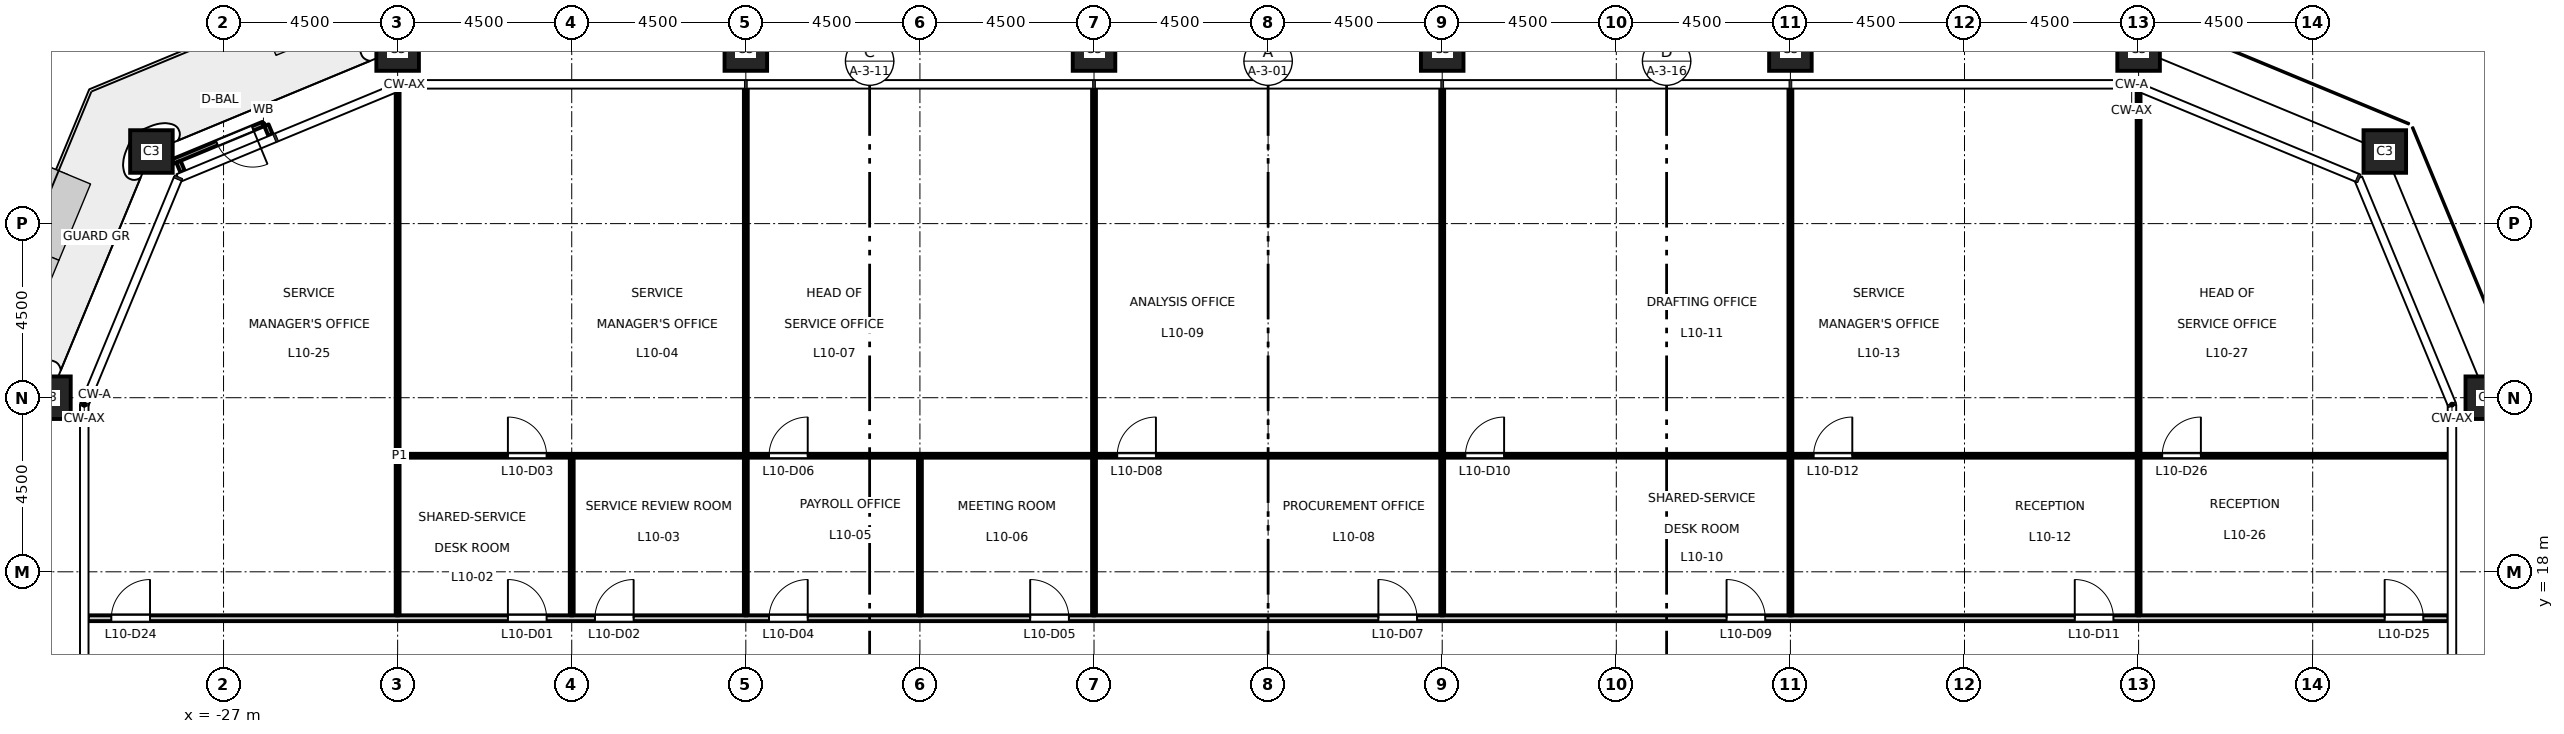
"""IFC4 building model, lengths in metres.
Left out: names, types, materials, properties, quantities, classifications, styles, units other than length and angle.
Written with IfcOpenShell. Run it as: python <this file> out.ifc"""

import sys

from ifc_helpers import new_model, si_unit, direction, frame, frame_2d, origin, origin_2d, place, context, subcontext, project, spatial, rectangle, hollow_rectangle, extrude, element, fill, save


model = new_model("IFC4")
c1 = context("Model", 3, precision=1e-05, world=origin(), true_north=direction((0.0, 1.0)))
c2 = subcontext(c1, "Body", "Model", "MODEL_VIEW")
j1 = project(units=[si_unit("LENGTHUNIT", "METRE"), si_unit("PLANEANGLEUNIT", "RADIAN")], contexts=[c1])
p1 = place(None, origin())
s1 = spatial("IfcSite", under=j1, at=p1, CompositionType="ELEMENT")
p2 = place(p1, origin())
s2 = spatial("IfcBuilding", under=s1, at=p2, CompositionType="ELEMENT")
p3 = place(p2, frame((0.0, 0.0, 49.2)))
s3 = spatial("IfcBuildingStorey", under=s2, at=p3, CompositionType="ELEMENT", Elevation=49.2)
for number, where, z_axis, x_axis in (
    (1, (31.5, 22.5, 0.0), (0.0, 0.0, 1.0), (1.0, 0.0, 0.0)),
    (2, (28.864, 28.864, 0.0), (0.0, 0.0, 1.0), (1.0, 0.0, 0.0)),
    (3, (22.5, 31.5, 0.0), (0.0, 0.0, 1.0), (1.0, 0.0, 0.0)),
    (4, (13.5, 31.5, 0.0), (0.0, 0.0, 1.0), (1.0, 0.0, 0.0)),
    (5, (4.5, 31.5, 0.0), (0.0, 0.0, 1.0), (1.0, 0.0, 0.0)),
    (6, (-4.5, 31.5, 0.0), (0.0, 0.0, 1.0), (1.0, 0.0, 0.0)),
    (7, (-13.5, 31.5, 0.0), (0.0, 0.0, 1.0), (1.0, 0.0, 0.0)),
    (8, (-22.5, 31.5, 0.0), (0.0, 0.0, 1.0), (1.0, 0.0, 0.0)),
    (9, (-28.864, 28.864, 0.0), (0.0, 0.0, 1.0), (1.0, 0.0, 0.0)),
    (10, (-31.5, 22.5, 0.0), (0.0, 0.0, 1.0), (1.0, 0.0, 0.0)),
):
    element("IfcColumn", number, at=place(p3, frame(where, z_axis=z_axis, x_axis=x_axis)), inside=s3, PredefinedType="COLUMN", context=c2, shape_type="SweptSolid", body=[
        extrude(hollow_rectangle(XDim=1.1, YDim=1.1, WallThickness=0.07, at=origin_2d()), origin(), (0.0, 0.0, 1.0), 4.5),
    ])
p4 = place(p3, frame((-25.783, 29.285, 0.0), z_axis=(0.0, 0.0, 1.0), x_axis=(-0.382942403136, 0.923772220778, 0.0)))
e11 = element("IfcWall", 11, at=p4, inside=s3, PredefinedType="STANDARD", context=c2, shape_type="SweptSolid", body=[
    extrude(rectangle(XDim=0.28, YDim=0.12, at=frame_2d((0.14, 0.0))), origin(), (0.0, 0.0, 1.0), 4.35),
])
p5 = place(p3, frame((-28.058, 28.343, 0.0), z_axis=(0.0, 0.0, 1.0), x_axis=(-0.382634050621, 0.923899985553, 0.0)))
e12 = element("IfcWall", 12, at=p5, inside=s3, PredefinedType="STANDARD", context=c2, shape_type="SweptSolid", body=[
    extrude(rectangle(XDim=0.28, YDim=0.12, at=frame_2d((0.14, 0.0))), origin(), (0.0, 0.0, 1.0), 4.35),
])
p6 = place(p3, frame((-25.969, 29.576, 0.0), z_axis=(0.0, 0.0, 1.0), x_axis=(-0.923897258763, -0.382640634603, 0.0)))
e13 = element("IfcWall", 13, at=p6, inside=s3, PredefinedType="STANDARD", context=c2, shape_type="SweptSolid", body=[
    extrude(rectangle(XDim=2.538, YDim=0.12, at=frame_2d((1.269, 0.0))), origin(), (0.0, 0.0, 1.0), 4.35),
])
p7 = place(p6, frame((0.3, 0.0, 0.0)))
e14 = element("IfcOpeningElement", 14, at=p7, cuts=e13, PredefinedType="OPENING", context=c2, shape_type="SweptSolid", body=[
    extrude(rectangle(XDim=1.0, YDim=2.4, at=frame_2d((0.5, 1.2))), frame((0.0, 0.07, 0.0), z_axis=(0.0, -1.0, 0.0), x_axis=(1.0, 0.0, 0.0)), (0.0, 0.0, 1.0), 0.14),
])
p8 = place(p3, frame((-30.51, 16.8, 0.0), z_axis=(0.0, 0.0, 1.0), x_axis=(1.0, 0.0, 0.0)))
e15 = element("IfcWall", 15, at=p8, inside=s3, PredefinedType="PARTITIONING", context=c2, shape_type="SweptSolid", body=[
    extrude(rectangle(XDim=61.02, YDim=0.15, at=frame_2d((30.51, 0.0))), origin(), (0.0, 0.0, 1.0), 4.35),
])
p9 = place(p8, frame((10.86, 0.0, 0.0)))
e16 = element("IfcOpeningElement", 16, at=p9, cuts=e15, PredefinedType="OPENING", context=c2, shape_type="SweptSolid", body=[
    extrude(rectangle(XDim=1.0, YDim=2.1, at=frame_2d((0.5, 1.05))), frame((0.0, 0.085, 0.0), z_axis=(0.0, -1.0, 0.0), x_axis=(1.0, 0.0, 0.0)), (0.0, 0.0, 1.0), 0.17),
])
p10 = place(p8, frame((13.11, 0.0, 0.0)))
e17 = element("IfcOpeningElement", 17, at=p10, cuts=e15, PredefinedType="OPENING", context=c2, shape_type="SweptSolid", body=[
    extrude(rectangle(XDim=1.0, YDim=2.1, at=frame_2d((0.5, 1.05))), frame((0.0, 0.085, 0.0), z_axis=(0.0, -1.0, 0.0), x_axis=(1.0, 0.0, 0.0)), (0.0, 0.0, 1.0), 0.17),
])
p11 = place(p8, frame((17.61, 0.0, 0.0)))
e18 = element("IfcOpeningElement", 18, at=p11, cuts=e15, PredefinedType="OPENING", context=c2, shape_type="SweptSolid", body=[
    extrude(rectangle(XDim=1.0, YDim=2.1, at=frame_2d((0.5, 1.05))), frame((0.0, 0.085, 0.0), z_axis=(0.0, -1.0, 0.0), x_axis=(1.0, 0.0, 0.0)), (0.0, 0.0, 1.0), 0.17),
])
p12 = place(p8, frame((24.36, 0.0, 0.0)))
e19 = element("IfcOpeningElement", 19, at=p12, cuts=e15, PredefinedType="OPENING", context=c2, shape_type="SweptSolid", body=[
    extrude(rectangle(XDim=1.0, YDim=2.1, at=frame_2d((0.5, 1.05))), frame((0.0, 0.085, 0.0), z_axis=(0.0, -1.0, 0.0), x_axis=(1.0, 0.0, 0.0)), (0.0, 0.0, 1.0), 0.17),
])
p13 = place(p8, frame((33.36, 0.0, 0.0)))
e20 = element("IfcOpeningElement", 20, at=p13, cuts=e15, PredefinedType="OPENING", context=c2, shape_type="SweptSolid", body=[
    extrude(rectangle(XDim=1.0, YDim=2.1, at=frame_2d((0.5, 1.05))), frame((0.0, 0.085, 0.0), z_axis=(0.0, -1.0, 0.0), x_axis=(1.0, 0.0, 0.0)), (0.0, 0.0, 1.0), 0.17),
])
p14 = place(p8, frame((42.36, 0.0, 0.0)))
e21 = element("IfcOpeningElement", 21, at=p14, cuts=e15, PredefinedType="OPENING", context=c2, shape_type="SweptSolid", body=[
    extrude(rectangle(XDim=1.0, YDim=2.1, at=frame_2d((0.5, 1.05))), frame((0.0, 0.085, 0.0), z_axis=(0.0, -1.0, 0.0), x_axis=(1.0, 0.0, 0.0)), (0.0, 0.0, 1.0), 0.17),
])
p15 = place(p8, frame((51.36, 0.0, 0.0)))
e22 = element("IfcOpeningElement", 22, at=p15, cuts=e15, PredefinedType="OPENING", context=c2, shape_type="SweptSolid", body=[
    extrude(rectangle(XDim=1.0, YDim=2.1, at=frame_2d((0.5, 1.05))), frame((0.0, 0.085, 0.0), z_axis=(0.0, -1.0, 0.0), x_axis=(1.0, 0.0, 0.0)), (0.0, 0.0, 1.0), 0.17),
])
p16 = place(p8, frame((0.61, 0.0, 0.0)))
e23 = element("IfcOpeningElement", 23, at=p16, cuts=e15, PredefinedType="OPENING", context=c2, shape_type="SweptSolid", body=[
    extrude(rectangle(XDim=1.0, YDim=2.1, at=frame_2d((0.5, 1.05))), frame((0.0, 0.085, 0.0), z_axis=(0.0, -1.0, 0.0), x_axis=(1.0, 0.0, 0.0)), (0.0, 0.0, 1.0), 0.17),
])
p17 = place(p8, frame((59.37, 0.0, 0.0)))
e24 = element("IfcOpeningElement", 24, at=p17, cuts=e15, PredefinedType="OPENING", context=c2, shape_type="SweptSolid", body=[
    extrude(rectangle(XDim=1.0, YDim=2.1, at=frame_2d((0.5, 1.05))), frame((0.0, 0.085, 0.0), z_axis=(0.0, -1.0, 0.0), x_axis=(1.0, 0.0, 0.0)), (0.0, 0.0, 1.0), 0.17),
])
p18 = place(p3, frame((-22.45, 21.0, 0.0), z_axis=(0.0, 0.0, 1.0), x_axis=(1.0, 0.0, 0.0)))
e25 = element("IfcWall", 25, at=p18, inside=s3, PredefinedType="PARTITIONING", context=c2, shape_type="SweptSolid", body=[
    extrude(rectangle(XDim=52.96, YDim=0.1, at=frame_2d((26.48, 0.0))), origin(), (0.0, 0.0, 1.0), 4.35),
])
p19 = place(p18, frame((2.8, 0.0, 0.0)))
e26 = element("IfcOpeningElement", 26, at=p19, cuts=e25, PredefinedType="OPENING", context=c2, shape_type="SweptSolid", body=[
    extrude(rectangle(XDim=1.0, YDim=2.1, at=frame_2d((0.5, 1.05))), frame((0.0, 0.06, 0.0), z_axis=(0.0, -1.0, 0.0), x_axis=(1.0, 0.0, 0.0)), (0.0, 0.0, 1.0), 0.12),
])
p20 = place(p18, frame((9.55, 0.0, 0.0)))
e27 = element("IfcOpeningElement", 27, at=p20, cuts=e25, PredefinedType="OPENING", context=c2, shape_type="SweptSolid", body=[
    extrude(rectangle(XDim=1.0, YDim=2.1, at=frame_2d((0.5, 1.05))), frame((0.0, 0.06, 0.0), z_axis=(0.0, -1.0, 0.0), x_axis=(1.0, 0.0, 0.0)), (0.0, 0.0, 1.0), 0.12),
])
p21 = place(p18, frame((18.55, 0.0, 0.0)))
e28 = element("IfcOpeningElement", 28, at=p21, cuts=e25, PredefinedType="OPENING", context=c2, shape_type="SweptSolid", body=[
    extrude(rectangle(XDim=1.0, YDim=2.1, at=frame_2d((0.5, 1.05))), frame((0.0, 0.06, 0.0), z_axis=(0.0, -1.0, 0.0), x_axis=(1.0, 0.0, 0.0)), (0.0, 0.0, 1.0), 0.12),
])
p22 = place(p18, frame((27.55, 0.0, 0.0)))
e29 = element("IfcOpeningElement", 29, at=p22, cuts=e25, PredefinedType="OPENING", context=c2, shape_type="SweptSolid", body=[
    extrude(rectangle(XDim=1.0, YDim=2.1, at=frame_2d((0.5, 1.05))), frame((0.0, 0.06, 0.0), z_axis=(0.0, -1.0, 0.0), x_axis=(1.0, 0.0, 0.0)), (0.0, 0.0, 1.0), 0.12),
])
p23 = place(p18, frame((36.55, 0.0, 0.0)))
e30 = element("IfcOpeningElement", 30, at=p23, cuts=e25, PredefinedType="OPENING", context=c2, shape_type="SweptSolid", body=[
    extrude(rectangle(XDim=1.0, YDim=2.1, at=frame_2d((0.5, 1.05))), frame((0.0, 0.06, 0.0), z_axis=(0.0, -1.0, 0.0), x_axis=(1.0, 0.0, 0.0)), (0.0, 0.0, 1.0), 0.12),
])
p24 = place(p18, frame((45.56, 0.0, 0.0)))
e31 = element("IfcOpeningElement", 31, at=p24, cuts=e25, PredefinedType="OPENING", context=c2, shape_type="SweptSolid", body=[
    extrude(rectangle(XDim=1.0, YDim=2.1, at=frame_2d((0.5, 1.05))), frame((0.0, 0.06, 0.0), z_axis=(0.0, -1.0, 0.0), x_axis=(1.0, 0.0, 0.0)), (0.0, 0.0, 1.0), 0.12),
])
p25 = place(p3, frame((-22.5, 16.875, 0.0), z_axis=(0.0, 0.0, 1.0), x_axis=(0.0, 1.0, 0.0)))
e32 = element("IfcWall", 32, at=p25, inside=s3, PredefinedType="PARTITIONING", context=c2, shape_type="SweptSolid", body=[
    extrude(rectangle(XDim=13.553, YDim=0.1, at=frame_2d((6.776, 0.0))), origin(), (0.0, 0.0, 1.0), 3.35),
])
p26 = place(p3, frame((-18.0, 16.875, 0.0), z_axis=(0.0, 0.0, 1.0), x_axis=(0.0, 1.0, 0.0)))
e33 = element("IfcWall", 33, at=p26, inside=s3, PredefinedType="PARTITIONING", context=c2, shape_type="SweptSolid", body=[
    extrude(rectangle(XDim=4.075, YDim=0.1, at=frame_2d((2.038, 0.0))), origin(), (0.0, 0.0, 1.0), 4.35),
])
p27 = place(p3, frame((-13.5, 16.875, 0.0), z_axis=(0.0, 0.0, 1.0), x_axis=(0.0, 1.0, 0.0)))
e34 = element("IfcWall", 34, at=p27, inside=s3, PredefinedType="PARTITIONING", context=c2, shape_type="SweptSolid", body=[
    extrude(rectangle(XDim=4.075, YDim=0.1, at=frame_2d((2.038, 0.0))), origin(), (0.0, 0.0, 1.0), 3.35),
])
p28 = place(p3, frame((-13.5, 21.05, 0.0), z_axis=(0.0, 0.0, 1.0), x_axis=(0.0, 1.0, 0.0)))
e35 = element("IfcWall", 35, at=p28, inside=s3, PredefinedType="PARTITIONING", context=c2, shape_type="SweptSolid", body=[
    extrude(rectangle(XDim=9.46, YDim=0.1, at=frame_2d((4.73, 0.0))), origin(), (0.0, 0.0, 1.0), 3.35),
])
p29 = place(p3, frame((-9.0, 16.875, 0.0), z_axis=(0.0, 0.0, 1.0), x_axis=(0.0, 1.0, 0.0)))
e36 = element("IfcWall", 36, at=p29, inside=s3, PredefinedType="PARTITIONING", context=c2, shape_type="SweptSolid", body=[
    extrude(rectangle(XDim=4.075, YDim=0.1, at=frame_2d((2.038, 0.0))), origin(), (0.0, 0.0, 1.0), 4.35),
])
p30 = place(p3, frame((-4.5, 16.875, 0.0), z_axis=(0.0, 0.0, 1.0), x_axis=(0.0, 1.0, 0.0)))
e37 = element("IfcWall", 37, at=p30, inside=s3, PredefinedType="PARTITIONING", context=c2, shape_type="SweptSolid", body=[
    extrude(rectangle(XDim=4.075, YDim=0.1, at=frame_2d((2.038, 0.0))), origin(), (0.0, 0.0, 1.0), 3.35),
])
p31 = place(p3, frame((-4.5, 21.05, 0.0), z_axis=(0.0, 0.0, 1.0), x_axis=(0.0, 1.0, 0.0)))
e38 = element("IfcWall", 38, at=p31, inside=s3, PredefinedType="PARTITIONING", context=c2, shape_type="SweptSolid", body=[
    extrude(rectangle(XDim=9.46, YDim=0.1, at=frame_2d((4.73, 0.0))), origin(), (0.0, 0.0, 1.0), 3.35),
])
p32 = place(p3, frame((4.5, 16.875, 0.0), z_axis=(0.0, 0.0, 1.0), x_axis=(0.0, 1.0, 0.0)))
e39 = element("IfcWall", 39, at=p32, inside=s3, PredefinedType="PARTITIONING", context=c2, shape_type="SweptSolid", body=[
    extrude(rectangle(XDim=4.075, YDim=0.1, at=frame_2d((2.038, 0.0))), origin(), (0.0, 0.0, 1.0), 3.35),
])
p33 = place(p3, frame((4.5, 21.05, 0.0), z_axis=(0.0, 0.0, 1.0), x_axis=(0.0, 1.0, 0.0)))
e40 = element("IfcWall", 40, at=p33, inside=s3, PredefinedType="PARTITIONING", context=c2, shape_type="SweptSolid", body=[
    extrude(rectangle(XDim=9.46, YDim=0.1, at=frame_2d((4.73, 0.0))), origin(), (0.0, 0.0, 1.0), 3.35),
])
p34 = place(p3, frame((13.5, 16.875, 0.0), z_axis=(0.0, 0.0, 1.0), x_axis=(0.0, 1.0, 0.0)))
e41 = element("IfcWall", 41, at=p34, inside=s3, PredefinedType="PARTITIONING", context=c2, shape_type="SweptSolid", body=[
    extrude(rectangle(XDim=4.075, YDim=0.1, at=frame_2d((2.038, 0.0))), origin(), (0.0, 0.0, 1.0), 3.35),
])
p35 = place(p3, frame((13.5, 21.05, 0.0), z_axis=(0.0, 0.0, 1.0), x_axis=(0.0, 1.0, 0.0)))
e42 = element("IfcWall", 42, at=p35, inside=s3, PredefinedType="PARTITIONING", context=c2, shape_type="SweptSolid", body=[
    extrude(rectangle(XDim=9.46, YDim=0.1, at=frame_2d((4.73, 0.0))), origin(), (0.0, 0.0, 1.0), 3.35),
])
p36 = place(p3, frame((22.5, 16.875, 0.0), z_axis=(0.0, 0.0, 1.0), x_axis=(0.0, 1.0, 0.0)))
e43 = element("IfcWall", 43, at=p36, inside=s3, PredefinedType="PARTITIONING", context=c2, shape_type="SweptSolid", body=[
    extrude(rectangle(XDim=4.075, YDim=0.1, at=frame_2d((2.038, 0.0))), origin(), (0.0, 0.0, 1.0), 3.35),
])
p37 = place(p3, frame((22.5, 21.05, 0.0), z_axis=(0.0, 0.0, 1.0), x_axis=(0.0, 1.0, 0.0)))
e44 = element("IfcWall", 44, at=p37, inside=s3, PredefinedType="PARTITIONING", context=c2, shape_type="SweptSolid", body=[
    extrude(rectangle(XDim=9.378, YDim=0.1, at=frame_2d((4.689, 0.0))), origin(), (0.0, 0.0, 1.0), 3.35),
])
p38 = place(p7, origin())
e45 = element("IfcDoor", 45, at=p38, inside=s3, OperationType="SINGLE_SWING_LEFT", PredefinedType="DOOR", context=c2, shape_type="SweptSolid", body=[
    extrude(rectangle(XDim=1.0, YDim=2.4, at=frame_2d((0.5, 1.2))), frame((0.0, 0.025, 0.0), z_axis=(0.0, -1.0, 0.0), x_axis=(1.0, 0.0, 0.0)), (0.0, 0.0, 1.0), 0.05),
])
fill(e14, e45)
p39 = place(p9, origin())
e46 = element("IfcDoor", 46, at=p39, inside=s3, OperationType="SINGLE_SWING_LEFT", PredefinedType="DOOR", context=c2, shape_type="SweptSolid", body=[
    extrude(rectangle(XDim=1.0, YDim=2.1, at=frame_2d((0.5, 1.05))), frame((0.0, 0.025, 0.0), z_axis=(0.0, -1.0, 0.0), x_axis=(1.0, 0.0, 0.0)), (0.0, 0.0, 1.0), 0.05),
])
fill(e16, e46)
p40 = place(p10, origin())
e47 = element("IfcDoor", 47, at=p40, inside=s3, OperationType="SINGLE_SWING_RIGHT", PredefinedType="DOOR", context=c2, shape_type="SweptSolid", body=[
    extrude(rectangle(XDim=1.0, YDim=2.1, at=frame_2d((0.5, 1.05))), frame((0.0, 0.025, 0.0), z_axis=(0.0, -1.0, 0.0), x_axis=(1.0, 0.0, 0.0)), (0.0, 0.0, 1.0), 0.05),
])
fill(e17, e47)
p41 = place(p19, origin())
e48 = element("IfcDoor", 48, at=p41, inside=s3, OperationType="SINGLE_SWING_LEFT", PredefinedType="DOOR", context=c2, shape_type="SweptSolid", body=[
    extrude(rectangle(XDim=1.0, YDim=2.1, at=frame_2d((0.5, 1.05))), frame((0.0, 0.025, 0.0), z_axis=(0.0, -1.0, 0.0), x_axis=(1.0, 0.0, 0.0)), (0.0, 0.0, 1.0), 0.05),
])
fill(e26, e48)
p42 = place(p11, origin())
e49 = element("IfcDoor", 49, at=p42, inside=s3, OperationType="SINGLE_SWING_RIGHT", PredefinedType="DOOR", context=c2, shape_type="SweptSolid", body=[
    extrude(rectangle(XDim=1.0, YDim=2.1, at=frame_2d((0.5, 1.05))), frame((0.0, 0.025, 0.0), z_axis=(0.0, -1.0, 0.0), x_axis=(1.0, 0.0, 0.0)), (0.0, 0.0, 1.0), 0.05),
])
fill(e18, e49)
p43 = place(p12, origin())
e50 = element("IfcDoor", 50, at=p43, inside=s3, OperationType="SINGLE_SWING_LEFT", PredefinedType="DOOR", context=c2, shape_type="SweptSolid", body=[
    extrude(rectangle(XDim=1.0, YDim=2.1, at=frame_2d((0.5, 1.05))), frame((0.0, 0.025, 0.0), z_axis=(0.0, -1.0, 0.0), x_axis=(1.0, 0.0, 0.0)), (0.0, 0.0, 1.0), 0.05),
])
fill(e19, e50)
p44 = place(p20, origin())
e51 = element("IfcDoor", 51, at=p44, inside=s3, OperationType="SINGLE_SWING_RIGHT", PredefinedType="DOOR", context=c2, shape_type="SweptSolid", body=[
    extrude(rectangle(XDim=1.0, YDim=2.1, at=frame_2d((0.5, 1.05))), frame((0.0, 0.025, 0.0), z_axis=(0.0, -1.0, 0.0), x_axis=(1.0, 0.0, 0.0)), (0.0, 0.0, 1.0), 0.05),
])
fill(e27, e51)
p45 = place(p13, origin())
e52 = element("IfcDoor", 52, at=p45, inside=s3, OperationType="SINGLE_SWING_LEFT", PredefinedType="DOOR", context=c2, shape_type="SweptSolid", body=[
    extrude(rectangle(XDim=1.0, YDim=2.1, at=frame_2d((0.5, 1.05))), frame((0.0, 0.025, 0.0), z_axis=(0.0, -1.0, 0.0), x_axis=(1.0, 0.0, 0.0)), (0.0, 0.0, 1.0), 0.05),
])
fill(e20, e52)
p46 = place(p21, origin())
e53 = element("IfcDoor", 53, at=p46, inside=s3, OperationType="SINGLE_SWING_RIGHT", PredefinedType="DOOR", context=c2, shape_type="SweptSolid", body=[
    extrude(rectangle(XDim=1.0, YDim=2.1, at=frame_2d((0.5, 1.05))), frame((0.0, 0.025, 0.0), z_axis=(0.0, -1.0, 0.0), x_axis=(1.0, 0.0, 0.0)), (0.0, 0.0, 1.0), 0.05),
])
fill(e28, e53)
p47 = place(p14, origin())
e54 = element("IfcDoor", 54, at=p47, inside=s3, OperationType="SINGLE_SWING_LEFT", PredefinedType="DOOR", context=c2, shape_type="SweptSolid", body=[
    extrude(rectangle(XDim=1.0, YDim=2.1, at=frame_2d((0.5, 1.05))), frame((0.0, 0.025, 0.0), z_axis=(0.0, -1.0, 0.0), x_axis=(1.0, 0.0, 0.0)), (0.0, 0.0, 1.0), 0.05),
])
fill(e21, e54)
p48 = place(p22, origin())
e55 = element("IfcDoor", 55, at=p48, inside=s3, OperationType="SINGLE_SWING_RIGHT", PredefinedType="DOOR", context=c2, shape_type="SweptSolid", body=[
    extrude(rectangle(XDim=1.0, YDim=2.1, at=frame_2d((0.5, 1.05))), frame((0.0, 0.025, 0.0), z_axis=(0.0, -1.0, 0.0), x_axis=(1.0, 0.0, 0.0)), (0.0, 0.0, 1.0), 0.05),
])
fill(e29, e55)
p49 = place(p15, origin())
e56 = element("IfcDoor", 56, at=p49, inside=s3, OperationType="SINGLE_SWING_LEFT", PredefinedType="DOOR", context=c2, shape_type="SweptSolid", body=[
    extrude(rectangle(XDim=1.0, YDim=2.1, at=frame_2d((0.5, 1.05))), frame((0.0, 0.025, 0.0), z_axis=(0.0, -1.0, 0.0), x_axis=(1.0, 0.0, 0.0)), (0.0, 0.0, 1.0), 0.05),
])
fill(e22, e56)
p50 = place(p23, origin())
e57 = element("IfcDoor", 57, at=p50, inside=s3, OperationType="SINGLE_SWING_RIGHT", PredefinedType="DOOR", context=c2, shape_type="SweptSolid", body=[
    extrude(rectangle(XDim=1.0, YDim=2.1, at=frame_2d((0.5, 1.05))), frame((0.0, 0.025, 0.0), z_axis=(0.0, -1.0, 0.0), x_axis=(1.0, 0.0, 0.0)), (0.0, 0.0, 1.0), 0.05),
])
fill(e30, e57)
p51 = place(p16, origin())
e58 = element("IfcDoor", 58, at=p51, inside=s3, OperationType="SINGLE_SWING_RIGHT", PredefinedType="DOOR", context=c2, shape_type="SweptSolid", body=[
    extrude(rectangle(XDim=1.0, YDim=2.1, at=frame_2d((0.5, 1.05))), frame((0.0, 0.025, 0.0), z_axis=(0.0, -1.0, 0.0), x_axis=(1.0, 0.0, 0.0)), (0.0, 0.0, 1.0), 0.05),
])
fill(e23, e58)
p52 = place(p17, origin())
e59 = element("IfcDoor", 59, at=p52, inside=s3, OperationType="SINGLE_SWING_LEFT", PredefinedType="DOOR", context=c2, shape_type="SweptSolid", body=[
    extrude(rectangle(XDim=1.0, YDim=2.1, at=frame_2d((0.5, 1.05))), frame((0.0, 0.025, 0.0), z_axis=(0.0, -1.0, 0.0), x_axis=(1.0, 0.0, 0.0)), (0.0, 0.0, 1.0), 0.05),
])
fill(e24, e59)
p53 = place(p24, origin())
e60 = element("IfcDoor", 60, at=p53, inside=s3, OperationType="SINGLE_SWING_RIGHT", PredefinedType="DOOR", context=c2, shape_type="SweptSolid", body=[
    extrude(rectangle(XDim=1.0, YDim=2.1, at=frame_2d((0.5, 1.05))), frame((0.0, 0.025, 0.0), z_axis=(0.0, -1.0, 0.0), x_axis=(1.0, 0.0, 0.0)), (0.0, 0.0, 1.0), 0.05),
])
fill(e31, e60)
save(model, sys.argv[1])
